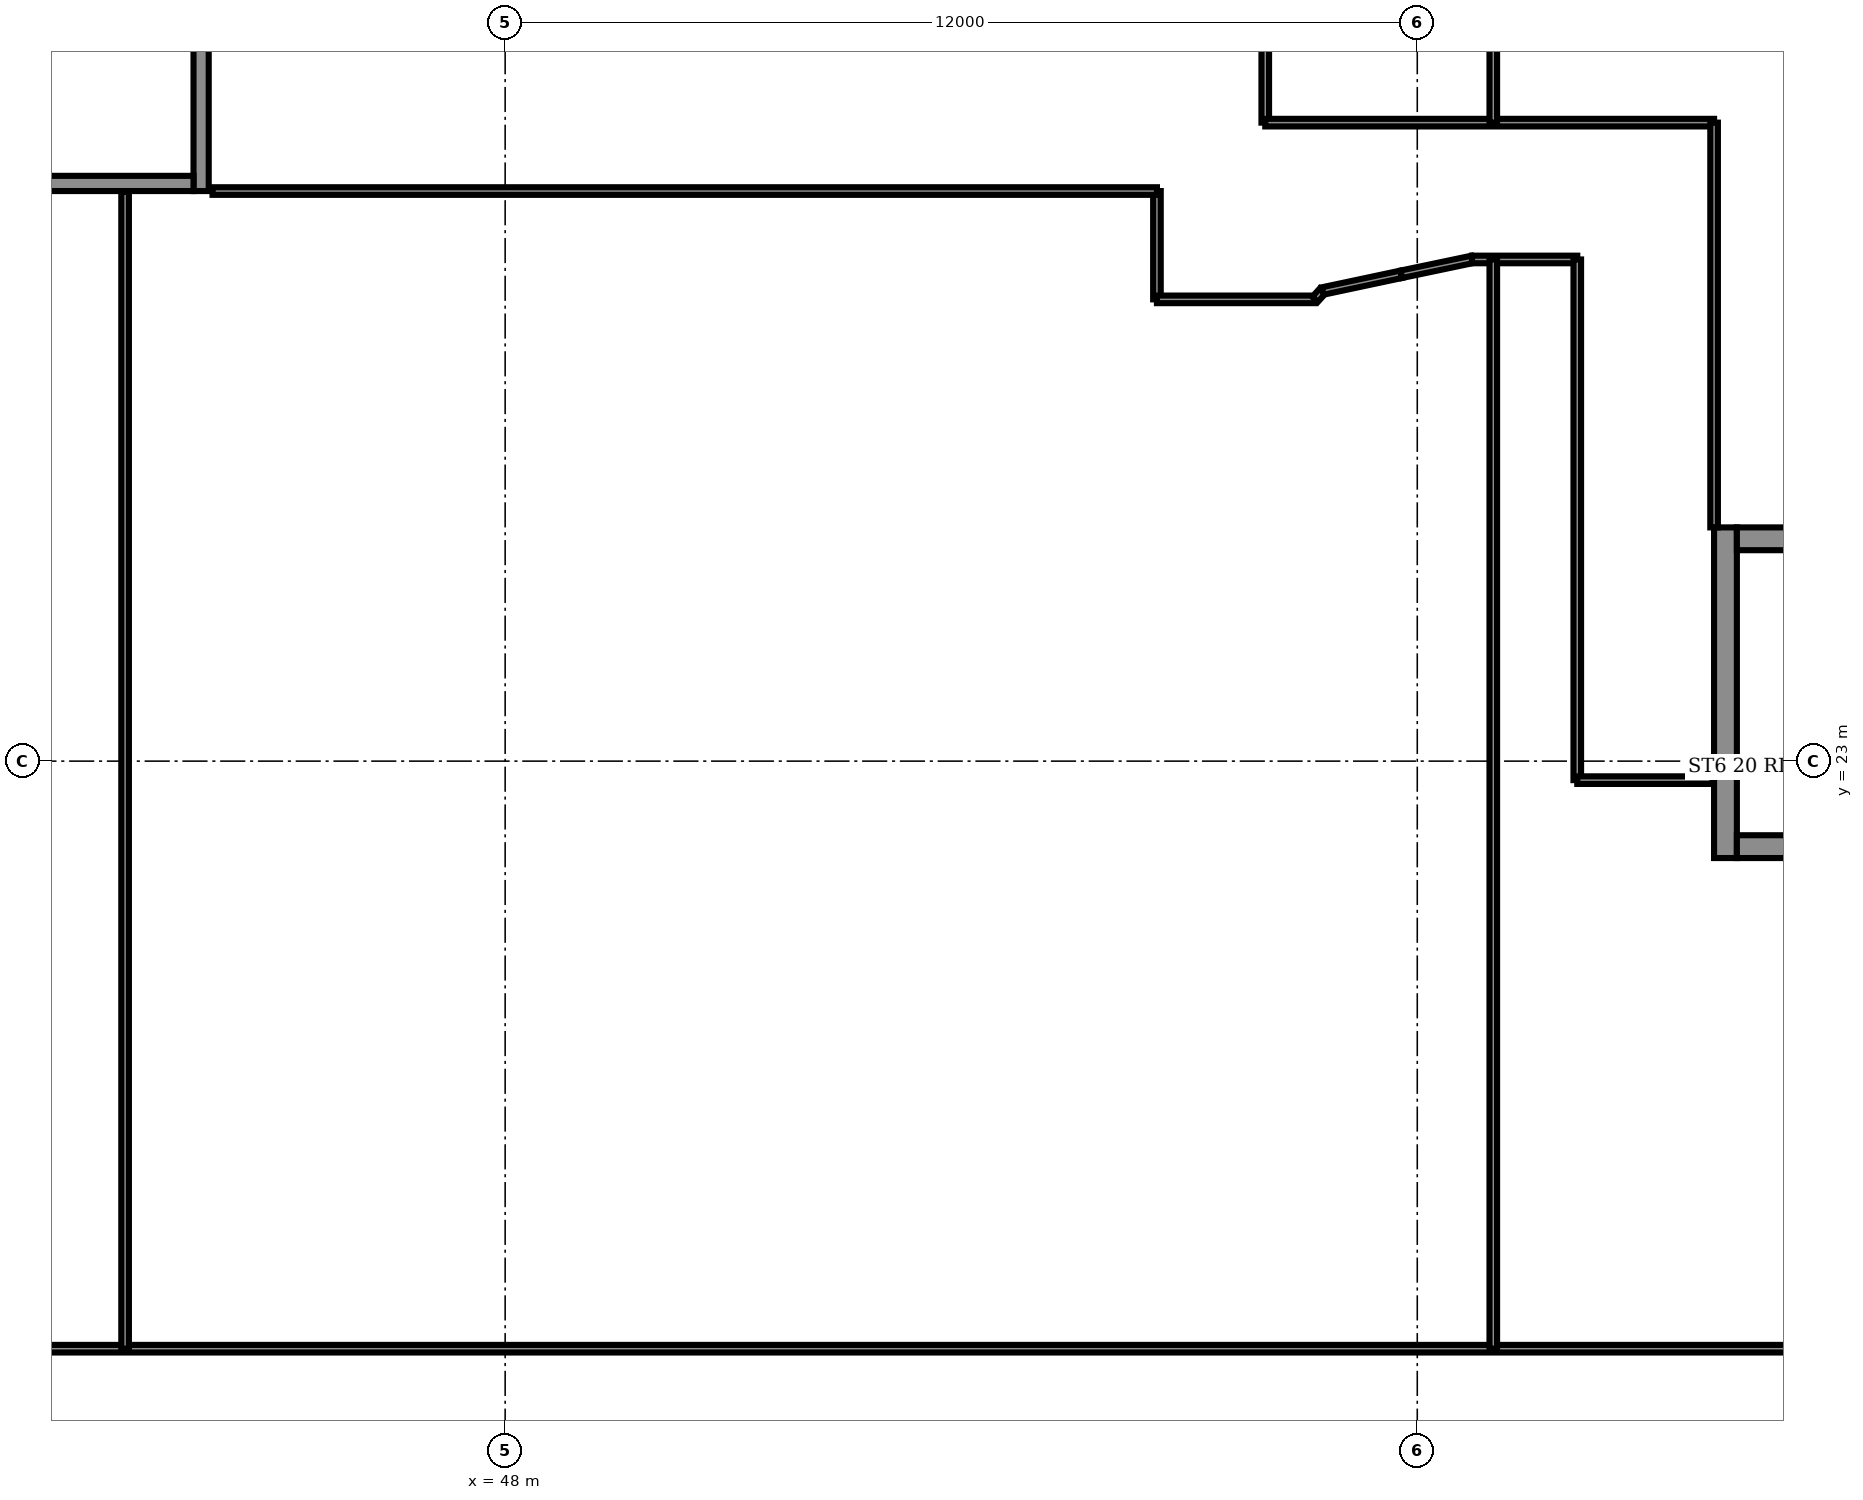
"""IFC4 building model, lengths in metres.
Left out: names, types, materials, properties, quantities, classifications, styles, units other than length and angle.
Written with IfcOpenShell. Run it as: python <this file> out.ifc"""

import sys

from ifc_helpers import new_model, si_unit, direction, frame, frame_2d, origin, origin_2d, place, context, subcontext, project, spatial, rectangle, i_section, extrude, element, fill, save


model = new_model("IFC4")
c1 = context("Model", 3, precision=1e-05, world=origin(), true_north=direction((0.0, 1.0)))
c2 = subcontext(c1, "Body", "Model", "MODEL_VIEW")
j1 = project(units=[si_unit("LENGTHUNIT", "METRE"), si_unit("PLANEANGLEUNIT", "RADIAN")], contexts=[c1])
p1 = place(None, origin())
s1 = spatial("IfcSite", under=j1, at=p1, CompositionType="ELEMENT")
p2 = place(p1, origin())
s2 = spatial("IfcBuilding", under=s1, at=p2, CompositionType="ELEMENT")
p3 = place(p2, frame((0.0, 0.0, 151.9)))
s3 = spatial("IfcBuildingStorey", under=s2, at=p3, CompositionType="ELEMENT", Elevation=151.9)
for number, where, z_axis, x_axis in (
    (1, (48.0, 23.0, 0.0), (0.0, 0.0, 1.0), (1.0, 0.0, 0.0)),
    (2, (60.0, 23.0, 0.0), (0.0, 0.0, 1.0), (1.0, 0.0, 0.0)),
):
    element("IfcColumn", number, at=place(p3, frame(where, z_axis=z_axis, x_axis=x_axis)), inside=s3, PredefinedType="COLUMN", context=c2, shape_type="SweptSolid", body=[
        extrude(i_section(OverallWidth=0.3, OverallDepth=0.5, WebThickness=0.014, FlangeThickness=0.028, FilletRadius=0.027, at=origin_2d()), origin(), (0.0, 0.0, 1.0), 3.6),
    ])
p4 = place(p3, frame((44.0, 30.5, 0.0), z_axis=(0.0, 0.0, 1.0), x_axis=(0.0, 1.0, 0.0)))
e3 = element("IfcWall", 3, at=p4, inside=s3, PredefinedType="PARTITIONING", context=c2, shape_type="SweptSolid", body=[
    extrude(rectangle(XDim=3.5, YDim=0.2, at=frame_2d((1.75, 0.0))), origin(), (0.0, 0.0, 1.0), 3.2),
])
p5 = place(p4, frame((1.2, 0.0, 0.0)))
e4 = element("IfcOpeningElement", 4, at=p5, cuts=e3, PredefinedType="OPENING", context=c2, shape_type="SweptSolid", body=[
    extrude(rectangle(XDim=1.1, YDim=2.1, at=frame_2d((0.55, 1.05))), frame((0.0, 0.11, 0.0), z_axis=(0.0, -1.0, 0.0), x_axis=(1.0, 0.0, 0.0)), (0.0, 0.0, 1.0), 0.22),
])
p6 = place(p3, frame((41.1, 30.6, 0.0), z_axis=(0.0, 0.0, 1.0), x_axis=(1.0, 0.0, 0.0)))
e5 = element("IfcWall", 5, at=p6, inside=s3, PredefinedType="PARTITIONING", context=c2, shape_type="SweptSolid", body=[
    extrude(rectangle(XDim=2.8, YDim=0.2, at=frame_2d((1.4, 0.0))), origin(), (0.0, 0.0, 1.0), 3.2),
])
p7 = place(p3, frame((64.055, 21.725, 0.0), z_axis=(0.0, 0.0, 1.0), x_axis=(0.0, 1.0, 0.0)))
e6 = element("IfcWall", 6, at=p7, inside=s3, PredefinedType="SHEAR", context=c2, shape_type="SweptSolid", body=[
    extrude(rectangle(XDim=4.35, YDim=0.3, at=frame_2d((2.175, 0.0))), origin(), (0.0, 0.0, 1.0), 3.2),
])
p8 = place(p7, frame((1.575, 0.0, 0.0)))
e7 = element("IfcOpeningElement", 7, at=p8, cuts=e6, PredefinedType="OPENING", context=c2, shape_type="SweptSolid", body=[
    extrude(rectangle(XDim=1.2, YDim=2.1, at=frame_2d((0.6, 1.05))), frame((0.0, 0.16, 0.0), z_axis=(0.0, -1.0, 0.0), x_axis=(1.0, 0.0, 0.0)), (0.0, 0.0, 1.0), 0.32),
])
p9 = place(p3, frame((18.2, 15.27, 0.0), z_axis=(0.0, 0.0, 1.0), x_axis=(1.0, 0.0, 0.0)))
e8 = element("IfcWall", 8, at=p9, inside=s3, PredefinedType="PARTITIONING", context=c2, shape_type="SweptSolid", body=[
    extrude(rectangle(XDim=62.291, YDim=0.1, at=frame_2d((31.146, 0.0))), origin(), (0.0, 0.0, 1.0), 2.58),
])
p10 = place(p9, frame((0.38, 0.0, 0.0)))
e9 = element("IfcOpeningElement", 9, at=p10, cuts=e8, PredefinedType="OPENING", context=c2, shape_type="SweptSolid", body=[
    extrude(rectangle(XDim=1.0, YDim=2.1, at=frame_2d((0.5, 1.05))), frame((0.0, 0.06, 0.0), z_axis=(0.0, -1.0, 0.0), x_axis=(1.0, 0.0, 0.0)), (0.0, 0.0, 1.0), 0.12),
])
p11 = place(p9, frame((58.102, 0.0, 0.0)))
e10 = element("IfcOpeningElement", 10, at=p11, cuts=e8, PredefinedType="OPENING", context=c2, shape_type="SweptSolid", body=[
    extrude(rectangle(XDim=1.0, YDim=2.1, at=frame_2d((0.5, 1.05))), frame((0.0, 0.06, 0.0), z_axis=(0.0, -1.0, 0.0), x_axis=(1.0, 0.0, 0.0)), (0.0, 0.0, 1.0), 0.12),
])
p12 = place(p3, frame((43.0, 15.27, 0.0), z_axis=(0.0, 0.0, 1.0), x_axis=(0.0, 1.0, 0.0)))
e11 = element("IfcWall", 11, at=p12, inside=s3, PredefinedType="PARTITIONING", context=c2, shape_type="SweptSolid", body=[
    extrude(rectangle(XDim=15.22, YDim=0.1, at=frame_2d((7.61, 0.0))), origin(), (0.0, 0.0, 1.0), 3.2),
])
p13 = place(p3, frame((43.0, 28.7, 0.0), z_axis=(0.0, 0.0, 1.0), x_axis=(1.0, 0.0, 0.0)))
e12 = element("IfcWall", 12, at=p13, inside=s3, PredefinedType="PARTITIONING", context=c2, shape_type="SweptSolid", body=[
    extrude(rectangle(XDim=6.0, YDim=0.1, at=frame_2d((3.0, 0.0))), origin(), (0.0, 0.0, 1.0), 3.2),
])
p14 = place(p13, frame((0.67, 0.0, 0.0)))
e13 = element("IfcOpeningElement", 13, at=p14, cuts=e12, PredefinedType="OPENING", context=c2, shape_type="SweptSolid", body=[
    extrude(rectangle(XDim=0.9, YDim=2.1, at=frame_2d((0.45, 1.05))), frame((0.0, 0.06, 0.0), z_axis=(0.0, -1.0, 0.0), x_axis=(1.0, 0.0, 0.0)), (0.0, 0.0, 1.0), 0.12),
])
p15 = place(p13, frame((2.61, 0.0, 0.0)))
e14 = element("IfcOpeningElement", 14, at=p15, cuts=e12, PredefinedType="OPENING", context=c2, shape_type="SweptSolid", body=[
    extrude(rectangle(XDim=0.9, YDim=2.1, at=frame_2d((0.45, 1.05))), frame((0.0, 0.06, 0.0), z_axis=(0.0, -1.0, 0.0), x_axis=(1.0, 0.0, 0.0)), (0.0, 0.0, 1.0), 0.12),
])
p16 = place(p13, frame((4.52, 0.0, 0.0)))
e15 = element("IfcOpeningElement", 15, at=p16, cuts=e12, PredefinedType="OPENING", context=c2, shape_type="SweptSolid", body=[
    extrude(rectangle(XDim=1.0, YDim=2.1, at=frame_2d((0.5, 1.05))), frame((0.0, 0.06, 0.0), z_axis=(0.0, -1.0, 0.0), x_axis=(1.0, 0.0, 0.0)), (0.0, 0.0, 1.0), 0.12),
])
for number, where, z_axis, x_axis in (
    (16, (45.14, 15.27, 0.0), (0.0, 0.0, 1.0), (0.0, 1.0, 0.0)),
    (17, (47.1, 15.27, 0.0), (0.0, 0.0, 1.0), (0.0, 1.0, 0.0)),
    (18, (49.0, 15.27, 0.0), (0.0, 0.0, 1.0), (0.0, 1.0, 0.0)),
):
    element("IfcWall", number, at=place(p3, frame(where, z_axis=z_axis, x_axis=x_axis)), inside=s3, PredefinedType="PARTITIONING", context=c2, shape_type="SweptSolid", body=[
        extrude(rectangle(XDim=13.43, YDim=0.1, at=frame_2d((6.715, 0.0))), origin(), (0.0, 0.0, 1.0), 3.2),
    ])
p17 = place(p3, frame((56.575, 29.075, 0.0), z_axis=(0.0, 0.0, 1.0), x_axis=(0.0, 1.0, 0.0)))
e19 = element("IfcWall", 19, at=p17, inside=s3, PredefinedType="PARTITIONING", context=c2, shape_type="SweptSolid", body=[
    extrude(rectangle(XDim=1.425, YDim=0.1, at=frame_2d((0.712, 0.0))), origin(), (0.0, 0.0, 1.0), 3.2),
])
p18 = place(p3, frame((56.575, 29.075, 0.0), z_axis=(0.0, 0.0, 1.0), x_axis=(1.0, 0.0, 0.0)))
e20 = element("IfcWall", 20, at=p18, inside=s3, PredefinedType="PARTITIONING", context=c2, shape_type="SweptSolid", body=[
    extrude(rectangle(XDim=2.08, YDim=0.1, at=frame_2d((1.04, 0.0))), origin(), (0.0, 0.0, 1.0), 3.2),
])
p19 = place(p3, frame((58.0, 31.4, 0.0), z_axis=(0.0, 0.0, 1.0), x_axis=(0.0, 1.0, 0.0)))
e21 = element("IfcWall", 21, at=p19, inside=s3, PredefinedType="PARTITIONING", context=c2, shape_type="SweptSolid", body=[
    extrude(rectangle(XDim=2.58, YDim=0.1, at=frame_2d((1.29, 0.0))), origin(), (0.0, 0.0, 1.0), 3.2),
])
p20 = place(p19, frame((0.9, 0.0, 0.0)))
e22 = element("IfcOpeningElement", 22, at=p20, cuts=e21, PredefinedType="OPENING", context=c2, shape_type="SweptSolid", body=[
    extrude(rectangle(XDim=1.0, YDim=2.1, at=frame_2d((0.5, 1.05))), frame((0.0, 0.06, 0.0), z_axis=(0.0, -1.0, 0.0), x_axis=(1.0, 0.0, 0.0)), (0.0, 0.0, 1.0), 0.12),
])
p21 = place(p3, frame((58.0, 31.4, 0.0), z_axis=(0.0, 0.0, 1.0), x_axis=(1.0, 0.0, 0.0)))
e23 = element("IfcWall", 23, at=p21, inside=s3, PredefinedType="PARTITIONING", context=c2, shape_type="SweptSolid", body=[
    extrude(rectangle(XDim=5.905, YDim=0.1, at=frame_2d((2.953, 0.0))), origin(), (0.0, 0.0, 1.0), 3.2),
])
p22 = place(p3, frame((58.655, 29.075, 0.0), z_axis=(0.0, 0.0, 1.0), x_axis=(0.671773, 0.740757, 0.0)))
e24 = element("IfcWall", 24, at=p22, inside=s3, PredefinedType="PARTITIONING", context=c2, shape_type="SweptSolid", body=[
    extrude(rectangle(XDim=0.149, YDim=0.1, at=frame_2d((0.074, 0.0))), origin(), (0.0, 0.0, 1.0), 3.2),
])
p23 = place(p3, frame((58.755, 29.185, 0.0), z_axis=(0.0, 0.0, 1.0), x_axis=(0.97816, 0.207859, 0.0)))
e25 = element("IfcWall", 25, at=p23, inside=s3, PredefinedType="PARTITIONING", context=c2, shape_type="SweptSolid", body=[
    extrude(rectangle(XDim=1.058, YDim=0.1, at=frame_2d((0.529, 0.0))), origin(), (0.0, 0.0, 1.0), 3.2),
])
p24 = place(p3, frame((59.79, 29.405, 0.0), z_axis=(0.0, 0.0, 1.0), x_axis=(0.978703, 0.205299, 0.0)))
e26 = element("IfcWall", 26, at=p24, inside=s3, PredefinedType="PARTITIONING", context=c2, shape_type="SweptSolid", body=[
    extrude(rectangle(XDim=0.95, YDim=0.1, at=frame_2d((0.475, 0.0))), origin(), (0.0, 0.0, 1.0), 3.2),
])
p25 = place(p3, frame((60.72, 29.6, 0.0), z_axis=(0.0, 0.0, 1.0), x_axis=(1.0, 0.0, 0.0)))
e27 = element("IfcWall", 27, at=p25, inside=s3, PredefinedType="PARTITIONING", context=c2, shape_type="SweptSolid", body=[
    extrude(rectangle(XDim=1.385, YDim=0.1, at=frame_2d((0.692, 0.0))), origin(), (0.0, 0.0, 1.0), 3.2),
])
p26 = place(p3, frame((61.0, 15.27, 0.0), z_axis=(0.0, 0.0, 1.0), x_axis=(0.0, 1.0, 0.0)))
e28 = element("IfcWall", 28, at=p26, inside=s3, PredefinedType="PARTITIONING", context=c2, shape_type="SweptSolid", body=[
    extrude(rectangle(XDim=14.33, YDim=0.1, at=frame_2d((7.165, 0.0))), origin(), (0.0, 0.0, 1.0), 3.2),
])
p27 = place(p3, frame((61.0, 31.4, 0.0), z_axis=(0.0, 0.0, 1.0), x_axis=(0.0, 1.0, 0.0)))
e29 = element("IfcWall", 29, at=p27, inside=s3, PredefinedType="PARTITIONING", context=c2, shape_type="SweptSolid", body=[
    extrude(rectangle(XDim=10.58, YDim=0.1, at=frame_2d((5.29, 0.0))), origin(), (0.0, 0.0, 1.0), 3.2),
])
p28 = place(p3, frame((62.105, 22.75, 0.0), z_axis=(0.0, 0.0, 1.0), x_axis=(0.0, 1.0, 0.0)))
e30 = element("IfcWall", 30, at=p28, inside=s3, PredefinedType="PARTITIONING", context=c2, shape_type="SweptSolid", body=[
    extrude(rectangle(XDim=6.85, YDim=0.1, at=frame_2d((3.425, 0.0))), origin(), (0.0, 0.0, 1.0), 3.2),
])
p29 = place(p3, frame((62.105, 22.75, 0.0), z_axis=(0.0, 0.0, 1.0), x_axis=(1.0, 0.0, 0.0)))
e31 = element("IfcWall", 31, at=p29, inside=s3, PredefinedType="PARTITIONING", context=c2, shape_type="SweptSolid", body=[
    extrude(rectangle(XDim=1.78, YDim=0.1, at=frame_2d((0.89, 0.0))), origin(), (0.0, 0.0, 1.0), 3.2),
])
p30 = place(p29, frame((0.25, 0.0, 0.0)))
e32 = element("IfcOpeningElement", 32, at=p30, cuts=e31, PredefinedType="OPENING", context=c2, shape_type="SweptSolid", body=[
    extrude(rectangle(XDim=1.0, YDim=2.1, at=frame_2d((0.5, 1.05))), frame((0.0, 0.06, 0.0), z_axis=(0.0, -1.0, 0.0), x_axis=(1.0, 0.0, 0.0)), (0.0, 0.0, 1.0), 0.12),
])
p31 = place(p3, frame((63.905, 26.075, 0.0), z_axis=(0.0, 0.0, 1.0), x_axis=(0.0, 1.0, 0.0)))
e33 = element("IfcWall", 33, at=p31, inside=s3, PredefinedType="PARTITIONING", context=c2, shape_type="SweptSolid", body=[
    extrude(rectangle(XDim=5.325, YDim=0.1, at=frame_2d((2.663, 0.0))), origin(), (0.0, 0.0, 1.0), 3.2),
])
p32 = place(p31, frame((3.345, 0.0, 0.0)))
e34 = element("IfcOpeningElement", 34, at=p32, cuts=e33, PredefinedType="OPENING", context=c2, shape_type="SweptSolid", body=[
    extrude(rectangle(XDim=1.8, YDim=2.1, at=frame_2d((0.9, 1.05))), frame((0.0, 0.06, 0.0), z_axis=(0.0, -1.0, 0.0), x_axis=(1.0, 0.0, 0.0)), (0.0, 0.0, 1.0), 0.12),
])
p33 = place(p3, frame((44.15, 30.5, 0.0), z_axis=(0.0, 0.0, 1.0), x_axis=(1.0, 0.0, 0.0)))
e35 = element("IfcWall", 35, at=p33, inside=s3, PredefinedType="PARTITIONING", context=c2, shape_type="SweptSolid", body=[
    extrude(rectangle(XDim=12.425, YDim=0.1, at=frame_2d((6.212, 0.0))), origin(), (0.0, 0.0, 1.0), 3.2),
])
p34 = place(p33, frame((11.15, 0.0, 0.0)))
e36 = element("IfcOpeningElement", 36, at=p34, cuts=e35, PredefinedType="OPENING", context=c2, shape_type="SweptSolid", body=[
    extrude(rectangle(XDim=1.0, YDim=2.1, at=frame_2d((0.5, 1.05))), frame((0.0, 0.06, 0.0), z_axis=(0.0, -1.0, 0.0), x_axis=(1.0, 0.0, 0.0)), (0.0, 0.0, 1.0), 0.12),
])
for number, where, z_axis, x_axis in (
    (37, (64.205, 21.875, 0.0), (0.0, 0.0, 1.0), (1.0, 0.0, 0.0)),
    (38, (64.205, 25.925, 0.0), (0.0, 0.0, 1.0), (1.0, 0.0, 0.0)),
):
    element("IfcWall", number, at=place(p3, frame(where, z_axis=z_axis, x_axis=x_axis)), inside=s3, PredefinedType="SHEAR", context=c2, shape_type="SweptSolid", body=[
        extrude(rectangle(XDim=7.5, YDim=0.3, at=frame_2d((3.75, 0.0))), origin(), (0.0, 0.0, 1.0), 3.2),
    ])
p35 = place(p5, origin())
e39 = element("IfcDoor", 39, at=p35, inside=s3, OperationType="SINGLE_SWING_LEFT", PredefinedType="DOOR", context=c2, shape_type="SweptSolid", body=[
    extrude(rectangle(XDim=1.1, YDim=2.1, at=frame_2d((0.55, 1.05))), frame((0.0, 0.025, 0.0), z_axis=(0.0, -1.0, 0.0), x_axis=(1.0, 0.0, 0.0)), (0.0, 0.0, 1.0), 0.05),
])
fill(e4, e39)
p36 = place(p8, origin())
e40 = element("IfcDoor", 40, at=p36, inside=s3, OperationType="SINGLE_SWING_RIGHT", PredefinedType="DOOR", context=c2, shape_type="SweptSolid", body=[
    extrude(rectangle(XDim=1.2, YDim=2.1, at=frame_2d((0.6, 1.05))), frame((0.0, 0.025, 0.0), z_axis=(0.0, -1.0, 0.0), x_axis=(1.0, 0.0, 0.0)), (0.0, 0.0, 1.0), 0.05),
])
fill(e7, e40)
p37 = place(p30, origin())
e41 = element("IfcDoor", 41, at=p37, inside=s3, OperationType="SINGLE_SWING_LEFT", PredefinedType="DOOR", context=c2, shape_type="SweptSolid", body=[
    extrude(rectangle(XDim=1.0, YDim=2.1, at=frame_2d((0.5, 1.05))), frame((0.0, 0.025, 0.0), z_axis=(0.0, -1.0, 0.0), x_axis=(1.0, 0.0, 0.0)), (0.0, 0.0, 1.0), 0.05),
])
fill(e32, e41)
p38 = place(p14, origin())
e42 = element("IfcDoor", 42, at=p38, inside=s3, OperationType="SINGLE_SWING_LEFT", PredefinedType="DOOR", context=c2, shape_type="SweptSolid", body=[
    extrude(rectangle(XDim=0.9, YDim=2.1, at=frame_2d((0.45, 1.05))), frame((0.0, 0.025, 0.0), z_axis=(0.0, -1.0, 0.0), x_axis=(1.0, 0.0, 0.0)), (0.0, 0.0, 1.0), 0.05),
])
fill(e13, e42)
p39 = place(p15, origin())
e43 = element("IfcDoor", 43, at=p39, inside=s3, OperationType="SINGLE_SWING_RIGHT", PredefinedType="DOOR", context=c2, shape_type="SweptSolid", body=[
    extrude(rectangle(XDim=0.9, YDim=2.1, at=frame_2d((0.45, 1.05))), frame((0.0, 0.025, 0.0), z_axis=(0.0, -1.0, 0.0), x_axis=(1.0, 0.0, 0.0)), (0.0, 0.0, 1.0), 0.05),
])
fill(e14, e43)
p40 = place(p16, origin())
e44 = element("IfcDoor", 44, at=p40, inside=s3, OperationType="SINGLE_SWING_RIGHT", PredefinedType="DOOR", context=c2, shape_type="SweptSolid", body=[
    extrude(rectangle(XDim=1.0, YDim=2.1, at=frame_2d((0.5, 1.05))), frame((0.0, 0.025, 0.0), z_axis=(0.0, -1.0, 0.0), x_axis=(1.0, 0.0, 0.0)), (0.0, 0.0, 1.0), 0.05),
])
fill(e15, e44)
p41 = place(p32, origin())
e45 = element("IfcDoor", 45, at=p41, inside=s3, OperationType="DOUBLE_DOOR_SINGLE_SWING", PredefinedType="DOOR", context=c2, shape_type="SweptSolid", body=[
    extrude(rectangle(XDim=1.8, YDim=2.1, at=frame_2d((0.9, 1.05))), frame((0.0, 0.025, 0.0), z_axis=(0.0, -1.0, 0.0), x_axis=(1.0, 0.0, 0.0)), (0.0, 0.0, 1.0), 0.05),
])
fill(e34, e45)
p42 = place(p34, origin())
e46 = element("IfcDoor", 46, at=p42, inside=s3, OperationType="SINGLE_SWING_RIGHT", PredefinedType="DOOR", context=c2, shape_type="SweptSolid", body=[
    extrude(rectangle(XDim=1.0, YDim=2.1, at=frame_2d((0.5, 1.05))), frame((0.0, 0.025, 0.0), z_axis=(0.0, -1.0, 0.0), x_axis=(1.0, 0.0, 0.0)), (0.0, 0.0, 1.0), 0.05),
])
fill(e36, e46)
p43 = place(p20, origin())
e47 = element("IfcDoor", 47, at=p43, inside=s3, OperationType="SINGLE_SWING_RIGHT", PredefinedType="DOOR", context=c2, shape_type="SweptSolid", body=[
    extrude(rectangle(XDim=1.0, YDim=2.1, at=frame_2d((0.5, 1.05))), frame((0.0, 0.025, 0.0), z_axis=(0.0, -1.0, 0.0), x_axis=(1.0, 0.0, 0.0)), (0.0, 0.0, 1.0), 0.05),
])
fill(e22, e47)
save(model, sys.argv[1])
